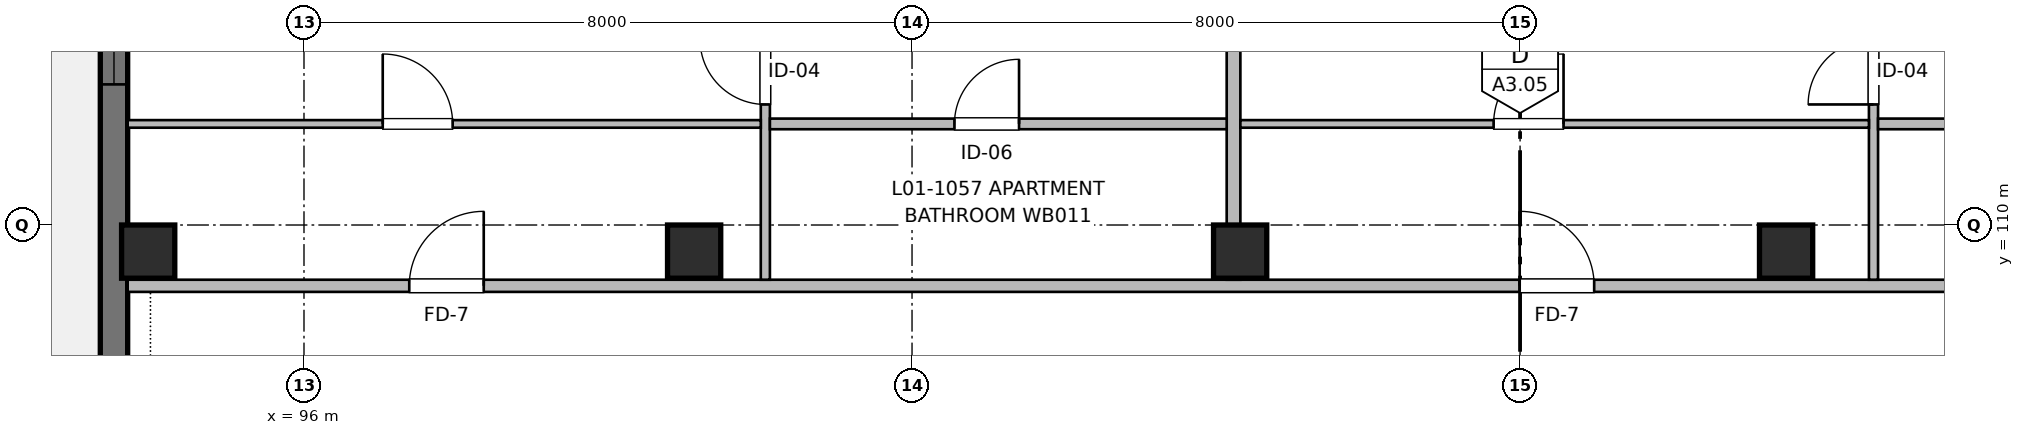
"""IFC4 building model, lengths in metres.
Left out: names, types, materials, properties, quantities, classifications, styles, units other than length and angle.
Written with IfcOpenShell. Run it as: python <this file> out.ifc"""

import sys

from ifc_helpers import new_model, si_unit, direction, frame, frame_2d, origin, origin_2d, place, context, subcontext, project, spatial, rectangle, extrude, element, fill, save


model = new_model("IFC4")
c1 = context("Model", 3, precision=1e-05, world=origin(), true_north=direction((0.0, 1.0)))
c2 = subcontext(c1, "Body", "Model", "MODEL_VIEW")
j1 = project(units=[si_unit("LENGTHUNIT", "METRE"), si_unit("PLANEANGLEUNIT", "RADIAN")], contexts=[c1])
p1 = place(None, origin())
s1 = spatial("IfcSite", under=j1, at=p1, CompositionType="ELEMENT")
p2 = place(p1, origin())
s2 = spatial("IfcBuilding", under=s1, at=p2, CompositionType="ELEMENT")
p3 = place(p2, frame((0.0, 0.0, 4.16)))
s3 = spatial("IfcBuildingStorey", under=s2, at=p3, CompositionType="ELEMENT", Elevation=4.16)
for number, where, z_axis, x_axis in (
    (1, (93.95, 109.65, 0.0), (0.0, 0.0, 1.0), (1.0, 0.0, 0.0)),
    (2, (101.133, 109.65, 0.0), (0.0, 0.0, 1.0), (1.0, 0.0, 0.0)),
    (3, (108.317, 109.65, 0.0), (0.0, 0.0, 1.0), (1.0, 0.0, 0.0)),
    (4, (115.5, 109.65, 0.0), (0.0, 0.0, 1.0), (1.0, 0.0, 0.0)),
):
    element("IfcColumn", number, at=place(p3, frame(where, z_axis=z_axis, x_axis=x_axis)), inside=s3, PredefinedType="COLUMN", context=c2, shape_type="SweptSolid", body=[
        extrude(rectangle(XDim=0.7, YDim=0.7, at=origin_2d()), origin(), (0.0, 0.0, 1.0), 3.2),
    ])
p4 = place(p3, frame((93.5, 100.0, 0.0), z_axis=(0.0, 0.0, 1.0), x_axis=(0.0, 1.0, 0.0)))
e5 = element("IfcWall", 5, at=p4, inside=s3, PredefinedType="SHEAR", context=c2, shape_type="SweptSolid", body=[
    extrude(rectangle(XDim=16.0, YDim=0.36, at=frame_2d((8.0, 0.0))), origin(), (0.0, 0.0, 1.0), 2.98),
])
p5 = place(p4, frame((3.4, 0.0, 0.0)))
e6 = element("IfcOpeningElement", 6, at=p5, cuts=e5, PredefinedType="OPENING", context=c2, shape_type="SweptSolid", body=[
    extrude(rectangle(XDim=1.2, YDim=2.2, at=frame_2d((0.6, 1.1))), frame((0.0, 0.19, 0.0), z_axis=(0.0, -1.0, 0.0), x_axis=(1.0, 0.0, 0.0)), (0.0, 0.0, 1.0), 0.38),
])
p6 = place(p4, frame((4.85, 0.0, 0.72)))
e7 = element("IfcOpeningElement", 7, at=p6, cuts=e5, PredefinedType="OPENING", context=c2, shape_type="SweptSolid", body=[
    extrude(rectangle(XDim=1.7, YDim=1.5, at=frame_2d((0.85, 0.75))), frame((0.0, 0.19, 0.0), z_axis=(0.0, -1.0, 0.0), x_axis=(1.0, 0.0, 0.0)), (0.0, 0.0, 1.0), 0.38),
])
p7 = place(p4, frame((11.85, 0.0, 0.9)))
e8 = element("IfcOpeningElement", 8, at=p7, cuts=e5, PredefinedType="OPENING", context=c2, shape_type="SweptSolid", body=[
    extrude(rectangle(XDim=1.2, YDim=1.05, at=frame_2d((0.6, 0.525))), frame((0.0, 0.19, 0.0), z_axis=(0.0, -1.0, 0.0), x_axis=(1.0, 0.0, 0.0)), (0.0, 0.0, 1.0), 0.38),
])
p8 = place(p3, frame((93.68, 109.2, 0.0), z_axis=(0.0, 0.0, 1.0), x_axis=(1.0, 0.0, 0.0)))
e9 = element("IfcWall", 9, at=p8, inside=s3, PredefinedType="PARTITIONING", context=c2, shape_type="SweptSolid", body=[
    extrude(rectangle(XDim=43.64, YDim=0.16, at=frame_2d((21.82, 0.0))), origin(), (0.0, 0.0, 1.0), 2.935),
])
p9 = place(p8, frame((3.705, 0.0, 0.0)))
e10 = element("IfcOpeningElement", 10, at=p9, cuts=e9, PredefinedType="OPENING", context=c2, shape_type="SweptSolid", body=[
    extrude(rectangle(XDim=0.98, YDim=2.15, at=frame_2d((0.49, 1.075))), frame((0.0, 0.09, 0.0), z_axis=(0.0, -1.0, 0.0), x_axis=(1.0, 0.0, 0.0)), (0.0, 0.0, 1.0), 0.18),
])
p10 = place(p8, frame((18.315, 0.0, 0.0)))
e11 = element("IfcOpeningElement", 11, at=p10, cuts=e9, PredefinedType="OPENING", context=c2, shape_type="SweptSolid", body=[
    extrude(rectangle(XDim=0.98, YDim=2.15, at=frame_2d((0.49, 1.075))), frame((0.0, 0.09, 0.0), z_axis=(0.0, -1.0, 0.0), x_axis=(1.0, 0.0, 0.0)), (0.0, 0.0, 1.0), 0.18),
])
p11 = place(p8, frame((32.885, 0.0, 0.0)))
e12 = element("IfcOpeningElement", 12, at=p11, cuts=e9, PredefinedType="OPENING", context=c2, shape_type="SweptSolid", body=[
    extrude(rectangle(XDim=0.98, YDim=2.15, at=frame_2d((0.49, 1.075))), frame((0.0, 0.09, 0.0), z_axis=(0.0, -1.0, 0.0), x_axis=(1.0, 0.0, 0.0)), (0.0, 0.0, 1.0), 0.18),
])
p12 = place(p3, frame((108.23, 109.28, 0.0), z_axis=(0.0, 0.0, 1.0), x_axis=(0.0, 1.0, 0.0)))
e13 = element("IfcWall", 13, at=p12, inside=s3, PredefinedType="PARTITIONING", context=c2, shape_type="SweptSolid", body=[
    extrude(rectangle(XDim=6.6, YDim=0.18, at=frame_2d((3.3, 0.0))), origin(), (0.0, 0.0, 1.0), 2.68),
])
p13 = place(p3, frame((102.07, 109.28, 0.0), z_axis=(0.0, 0.0, 1.0), x_axis=(0.0, 1.0, 0.0)))
e14 = element("IfcWall", 14, at=p13, inside=s3, PredefinedType="PARTITIONING", context=c2, shape_type="SweptSolid", body=[
    extrude(rectangle(XDim=6.6, YDim=0.12, at=frame_2d((3.3, 0.0))), origin(), (0.0, 0.0, 1.0), 2.935),
])
p14 = place(p13, frame((2.306, 0.0, 0.0)))
e15 = element("IfcOpeningElement", 15, at=p14, cuts=e14, PredefinedType="OPENING", context=c2, shape_type="SweptSolid", body=[
    extrude(rectangle(XDim=0.86, YDim=2.1, at=frame_2d((0.43, 1.05))), frame((0.0, 0.07, 0.0), z_axis=(0.0, -1.0, 0.0), x_axis=(1.0, 0.0, 0.0)), (0.0, 0.0, 1.0), 0.14),
])
p15 = place(p13, frame((4.097, 0.0, 0.0)))
e16 = element("IfcOpeningElement", 16, at=p15, cuts=e14, PredefinedType="OPENING", context=c2, shape_type="SweptSolid", body=[
    extrude(rectangle(XDim=0.9, YDim=2.1, at=frame_2d((0.45, 1.05))), frame((0.0, 0.07, 0.0), z_axis=(0.0, -1.0, 0.0), x_axis=(1.0, 0.0, 0.0)), (0.0, 0.0, 1.0), 0.14),
])
p16 = place(p3, frame((102.13, 111.33, 0.0), z_axis=(0.0, 0.0, 1.0), x_axis=(1.0, 0.0, 0.0)))
e17 = element("IfcWall", 17, at=p16, inside=s3, PredefinedType="PARTITIONING", context=c2, shape_type="SweptSolid", body=[
    extrude(rectangle(XDim=6.01, YDim=0.14, at=frame_2d((3.005, 0.0))), origin(), (0.0, 0.0, 1.0), 2.935),
])
p17 = place(p16, frame((2.428, 0.0, 0.0)))
e18 = element("IfcOpeningElement", 18, at=p17, cuts=e17, PredefinedType="OPENING", context=c2, shape_type="SweptSolid", body=[
    extrude(rectangle(XDim=0.85, YDim=2.05, at=frame_2d((0.425, 1.025))), frame((0.0, 0.08, 0.0), z_axis=(0.0, -1.0, 0.0), x_axis=(1.0, 0.0, 0.0)), (0.0, 0.0, 1.0), 0.16),
])
p18 = place(p3, frame((93.68, 111.33, 0.0), z_axis=(0.0, 0.0, 1.0), x_axis=(1.0, 0.0, 0.0)))
e19 = element("IfcWall", 19, at=p18, inside=s3, PredefinedType="PARTITIONING", context=c2, shape_type="SweptSolid", body=[
    extrude(rectangle(XDim=8.33, YDim=0.1, at=frame_2d((4.165, 0.0))), origin(), (0.0, 0.0, 1.0), 2.935),
])
p19 = place(p18, frame((3.356, 0.0, 0.0)))
e20 = element("IfcOpeningElement", 20, at=p19, cuts=e19, PredefinedType="OPENING", context=c2, shape_type="SweptSolid", body=[
    extrude(rectangle(XDim=0.92, YDim=2.1, at=frame_2d((0.46, 1.05))), frame((0.0, 0.06, 0.0), z_axis=(0.0, -1.0, 0.0), x_axis=(1.0, 0.0, 0.0)), (0.0, 0.0, 1.0), 0.12),
])
p20 = place(p3, frame((116.65, 109.28, 0.0), z_axis=(0.0, 0.0, 1.0), x_axis=(0.0, 1.0, 0.0)))
e21 = element("IfcWall", 21, at=p20, inside=s3, PredefinedType="PARTITIONING", context=c2, shape_type="SweptSolid", body=[
    extrude(rectangle(XDim=6.6, YDim=0.12, at=frame_2d((3.3, 0.0))), origin(), (0.0, 0.0, 1.0), 2.935),
])
p21 = place(p20, frame((2.306, 0.0, 0.0)))
e22 = element("IfcOpeningElement", 22, at=p21, cuts=e21, PredefinedType="OPENING", context=c2, shape_type="SweptSolid", body=[
    extrude(rectangle(XDim=0.86, YDim=2.1, at=frame_2d((0.43, 1.05))), frame((0.0, 0.07, 0.0), z_axis=(0.0, -1.0, 0.0), x_axis=(1.0, 0.0, 0.0)), (0.0, 0.0, 1.0), 0.14),
])
p22 = place(p20, frame((4.097, 0.0, 0.0)))
e23 = element("IfcOpeningElement", 23, at=p22, cuts=e21, PredefinedType="OPENING", context=c2, shape_type="SweptSolid", body=[
    extrude(rectangle(XDim=0.9, YDim=2.1, at=frame_2d((0.45, 1.05))), frame((0.0, 0.07, 0.0), z_axis=(0.0, -1.0, 0.0), x_axis=(1.0, 0.0, 0.0)), (0.0, 0.0, 1.0), 0.14),
])
p23 = place(p3, frame((116.71, 111.33, 0.0), z_axis=(0.0, 0.0, 1.0), x_axis=(1.0, 0.0, 0.0)))
e24 = element("IfcWall", 24, at=p23, inside=s3, PredefinedType="PARTITIONING", context=c2, shape_type="SweptSolid", body=[
    extrude(rectangle(XDim=5.97, YDim=0.14, at=frame_2d((2.985, 0.0))), origin(), (0.0, 0.0, 1.0), 2.935),
])
p24 = place(p23, frame((2.412, 0.0, 0.0)))
e25 = element("IfcOpeningElement", 25, at=p24, cuts=e24, PredefinedType="OPENING", context=c2, shape_type="SweptSolid", body=[
    extrude(rectangle(XDim=0.85, YDim=2.05, at=frame_2d((0.425, 1.025))), frame((0.0, 0.08, 0.0), z_axis=(0.0, -1.0, 0.0), x_axis=(1.0, 0.0, 0.0)), (0.0, 0.0, 1.0), 0.16),
])
p25 = place(p3, frame((108.32, 111.33, 0.0), z_axis=(0.0, 0.0, 1.0), x_axis=(1.0, 0.0, 0.0)))
e26 = element("IfcWall", 26, at=p25, inside=s3, PredefinedType="PARTITIONING", context=c2, shape_type="SweptSolid", body=[
    extrude(rectangle(XDim=8.27, YDim=0.1, at=frame_2d((4.135, 0.0))), origin(), (0.0, 0.0, 1.0), 2.935),
])
p26 = place(p25, frame((3.332, 0.0, 0.0)))
e27 = element("IfcOpeningElement", 27, at=p26, cuts=e26, PredefinedType="OPENING", context=c2, shape_type="SweptSolid", body=[
    extrude(rectangle(XDim=0.92, YDim=2.1, at=frame_2d((0.46, 1.05))), frame((0.0, 0.06, 0.0), z_axis=(0.0, -1.0, 0.0), x_axis=(1.0, 0.0, 0.0)), (0.0, 0.0, 1.0), 0.12),
])
p27 = place(p7, origin())
e28 = element("IfcWindow", 28, at=p27, inside=s3, PartitioningType="SINGLE_PANEL", PredefinedType="WINDOW", context=c2, shape_type="SweptSolid", body=[
    extrude(rectangle(XDim=1.2, YDim=1.05, at=frame_2d((0.6, 0.525))), frame((0.0, 0.03, 0.0), z_axis=(0.0, -1.0, 0.0), x_axis=(1.0, 0.0, 0.0)), (0.0, 0.0, 1.0), 0.06),
])
fill(e8, e28)
p28 = place(p9, origin())
e29 = element("IfcDoor", 29, at=p28, inside=s3, OperationType="SINGLE_SWING_RIGHT", PredefinedType="DOOR", context=c2, shape_type="SweptSolid", body=[
    extrude(rectangle(XDim=0.98, YDim=2.15, at=frame_2d((0.49, 1.075))), frame((0.0, 0.025, 0.0), z_axis=(0.0, -1.0, 0.0), x_axis=(1.0, 0.0, 0.0)), (0.0, 0.0, 1.0), 0.05),
])
fill(e10, e29)
p29 = place(p19, origin())
e30 = element("IfcDoor", 30, at=p29, inside=s3, OperationType="SINGLE_SWING_LEFT", PredefinedType="DOOR", context=c2, shape_type="SweptSolid", body=[
    extrude(rectangle(XDim=0.92, YDim=2.1, at=frame_2d((0.46, 1.05))), frame((0.0, 0.025, 0.0), z_axis=(0.0, -1.0, 0.0), x_axis=(1.0, 0.0, 0.0)), (0.0, 0.0, 1.0), 0.05),
])
fill(e20, e30)
p30 = place(p14, origin())
e31 = element("IfcDoor", 31, at=p30, inside=s3, OperationType="SINGLE_SWING_RIGHT", PredefinedType="DOOR", context=c2, shape_type="SweptSolid", body=[
    extrude(rectangle(XDim=0.86, YDim=2.1, at=frame_2d((0.43, 1.05))), frame((0.0, 0.025, 0.0), z_axis=(0.0, -1.0, 0.0), x_axis=(1.0, 0.0, 0.0)), (0.0, 0.0, 1.0), 0.05),
])
fill(e15, e31)
p31 = place(p17, origin())
e32 = element("IfcDoor", 32, at=p31, inside=s3, OperationType="SINGLE_SWING_RIGHT", PredefinedType="DOOR", context=c2, shape_type="SweptSolid", body=[
    extrude(rectangle(XDim=0.85, YDim=2.05, at=frame_2d((0.425, 1.025))), frame((0.0, 0.025, 0.0), z_axis=(0.0, -1.0, 0.0), x_axis=(1.0, 0.0, 0.0)), (0.0, 0.0, 1.0), 0.05),
])
fill(e18, e32)
p32 = place(p10, origin())
e33 = element("IfcDoor", 33, at=p32, inside=s3, OperationType="SINGLE_SWING_LEFT", PredefinedType="DOOR", context=c2, shape_type="SweptSolid", body=[
    extrude(rectangle(XDim=0.98, YDim=2.15, at=frame_2d((0.49, 1.075))), frame((0.0, 0.025, 0.0), z_axis=(0.0, -1.0, 0.0), x_axis=(1.0, 0.0, 0.0)), (0.0, 0.0, 1.0), 0.05),
])
fill(e11, e33)
p33 = place(p26, origin())
e34 = element("IfcDoor", 34, at=p33, inside=s3, OperationType="SINGLE_SWING_RIGHT", PredefinedType="DOOR", context=c2, shape_type="SweptSolid", body=[
    extrude(rectangle(XDim=0.92, YDim=2.1, at=frame_2d((0.46, 1.05))), frame((0.0, 0.025, 0.0), z_axis=(0.0, -1.0, 0.0), x_axis=(1.0, 0.0, 0.0)), (0.0, 0.0, 1.0), 0.05),
])
fill(e27, e34)
p34 = place(p21, origin())
e35 = element("IfcDoor", 35, at=p34, inside=s3, OperationType="SINGLE_SWING_LEFT", PredefinedType="DOOR", context=c2, shape_type="SweptSolid", body=[
    extrude(rectangle(XDim=0.86, YDim=2.1, at=frame_2d((0.43, 1.05))), frame((0.0, 0.025, 0.0), z_axis=(0.0, -1.0, 0.0), x_axis=(1.0, 0.0, 0.0)), (0.0, 0.0, 1.0), 0.05),
])
fill(e22, e35)
save(model, sys.argv[1])
